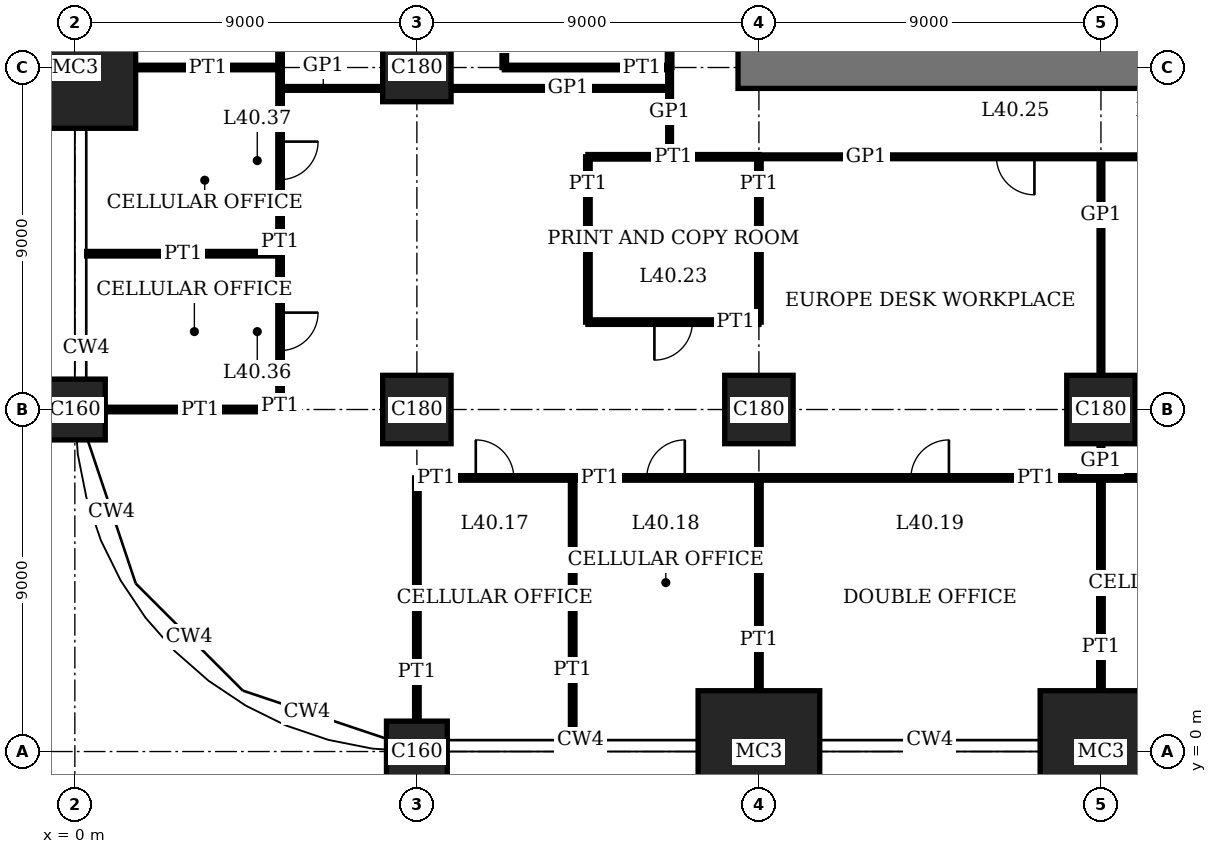
"""IFC4 building model, lengths in metres.
Left out: names, types, materials, properties, quantities, classifications, styles, units other than length and angle.
Written with IfcOpenShell. Run it as: python <this file> out.ifc"""

import sys

from ifc_helpers import new_model, si_unit, direction, frame, frame_2d, origin, origin_2d, place, context, subcontext, project, spatial, rectangle, extrude, element, fill, save


model = new_model("IFC4")
c1 = context("Model", 3, precision=1e-05, world=origin(), true_north=direction((0.0, 1.0)))
c2 = subcontext(c1, "Body", "Model", "MODEL_VIEW")
j1 = project(units=[si_unit("LENGTHUNIT", "METRE"), si_unit("PLANEANGLEUNIT", "RADIAN")], contexts=[c1])
p1 = place(None, origin())
s1 = spatial("IfcSite", under=j1, at=p1, CompositionType="ELEMENT")
p2 = place(p1, origin())
s2 = spatial("IfcBuilding", under=s1, at=p2, CompositionType="ELEMENT")
p3 = place(p2, frame((0.0, 0.0, 166.2)))
s3 = spatial("IfcBuildingStorey", under=s2, at=p3, CompositionType="ELEMENT", Elevation=166.2)
p4 = place(p3, frame((0.0, 9.0, 0.0), z_axis=(0.0, 0.0, 1.0), x_axis=(1.0, 0.0, 0.0)))
e1 = element("IfcColumn", 1, at=p4, inside=s3, PredefinedType="COLUMN", context=c2, shape_type="SweptSolid", body=[
    extrude(rectangle(XDim=1.6, YDim=1.6, at=origin_2d()), origin(), (0.0, 0.0, 1.0), 4.0),
])
p5 = place(p3, frame((0.0, 18.0, 0.0), z_axis=(0.0, 0.0, 1.0), x_axis=(1.0, 0.0, 0.0)))
e2 = element("IfcColumn", 2, at=p5, inside=s3, PredefinedType="COLUMN", context=c2, shape_type="SweptSolid", body=[
    extrude(rectangle(XDim=3.2, YDim=3.2, at=origin_2d()), origin(), (0.0, 0.0, 1.0), 4.0),
])
p6 = place(p3, frame((9.0, 0.0, 0.0), z_axis=(0.0, 0.0, 1.0), x_axis=(1.0, 0.0, 0.0)))
e3 = element("IfcColumn", 3, at=p6, inside=s3, PredefinedType="COLUMN", context=c2, shape_type="SweptSolid", body=[
    extrude(rectangle(XDim=1.6, YDim=1.6, at=origin_2d()), origin(), (0.0, 0.0, 1.0), 4.0),
])
for number, where, z_axis, x_axis in (
    (4, (9.0, 9.0, 0.0), (0.0, 0.0, 1.0), (1.0, 0.0, 0.0)),
    (5, (9.0, 18.0, 0.0), (0.0, 0.0, 1.0), (1.0, 0.0, 0.0)),
):
    element("IfcColumn", number, at=place(p3, frame(where, z_axis=z_axis, x_axis=x_axis)), inside=s3, PredefinedType="COLUMN", context=c2, shape_type="SweptSolid", body=[
        extrude(rectangle(XDim=1.8, YDim=1.8, at=origin_2d()), origin(), (0.0, 0.0, 1.0), 4.0),
    ])
p7 = place(p3, frame((18.0, 0.0, 0.0), z_axis=(0.0, 0.0, 1.0), x_axis=(1.0, 0.0, 0.0)))
e6 = element("IfcColumn", 6, at=p7, inside=s3, PredefinedType="COLUMN", context=c2, shape_type="SweptSolid", body=[
    extrude(rectangle(XDim=3.2, YDim=3.2, at=origin_2d()), origin(), (0.0, 0.0, 1.0), 4.0),
])
p8 = place(p3, frame((18.0, 9.0, 0.0), z_axis=(0.0, 0.0, 1.0), x_axis=(1.0, 0.0, 0.0)))
e7 = element("IfcColumn", 7, at=p8, inside=s3, PredefinedType="COLUMN", context=c2, shape_type="SweptSolid", body=[
    extrude(rectangle(XDim=1.8, YDim=1.8, at=origin_2d()), origin(), (0.0, 0.0, 1.0), 4.0),
])
p9 = place(p3, frame((27.0, 0.0, 0.0), z_axis=(0.0, 0.0, 1.0), x_axis=(1.0, 0.0, 0.0)))
e8 = element("IfcColumn", 8, at=p9, inside=s3, PredefinedType="COLUMN", context=c2, shape_type="SweptSolid", body=[
    extrude(rectangle(XDim=3.2, YDim=3.2, at=origin_2d()), origin(), (0.0, 0.0, 1.0), 4.0),
])
p10 = place(p3, frame((27.0, 9.0, 0.0), z_axis=(0.0, 0.0, 1.0), x_axis=(1.0, 0.0, 0.0)))
e9 = element("IfcColumn", 9, at=p10, inside=s3, PredefinedType="COLUMN", context=c2, shape_type="SweptSolid", body=[
    extrude(rectangle(XDim=1.8, YDim=1.8, at=origin_2d()), origin(), (0.0, 0.0, 1.0), 4.0),
])
p11 = place(p3, frame((17.45, 18.0, 0.0), z_axis=(0.0, 0.0, 1.0), x_axis=(1.0, 0.0, 0.0)))
e10 = element("IfcWall", 10, at=p11, inside=s3, PredefinedType="SHEAR", context=c2, shape_type="SweptSolid", body=[
    extrude(rectangle(XDim=28.1, YDim=1.1, at=frame_2d((14.05, 0.0))), origin(), (0.0, 0.0, 1.0), 4.0),
])
p12 = place(p11, frame((11.55, 0.0, 0.0)))
e11 = element("IfcOpeningElement", 11, at=p12, cuts=e10, PredefinedType="OPENING", context=c2, shape_type="SweptSolid", body=[
    extrude(rectangle(XDim=1.0, YDim=2.4, at=frame_2d((0.5, 1.2))), frame((0.0, 0.56, 0.0), z_axis=(0.0, -1.0, 0.0), x_axis=(1.0, 0.0, 0.0)), (0.0, 0.0, 1.0), 1.12),
])
p13 = place(p11, frame((16.55, 0.0, 0.0)))
e12 = element("IfcOpeningElement", 12, at=p13, cuts=e10, PredefinedType="OPENING", context=c2, shape_type="SweptSolid", body=[
    extrude(rectangle(XDim=1.0, YDim=2.4, at=frame_2d((0.5, 1.2))), frame((0.0, 0.56, 0.0), z_axis=(0.0, -1.0, 0.0), x_axis=(1.0, 0.0, 0.0)), (0.0, 0.0, 1.0), 1.12),
])
p14 = place(p11, frame((20.0, 0.0, 0.0)))
e13 = element("IfcOpeningElement", 13, at=p14, cuts=e10, PredefinedType="OPENING", context=c2, shape_type="SweptSolid", body=[
    extrude(rectangle(XDim=1.1, YDim=2.4, at=frame_2d((0.55, 1.2))), frame((0.0, 0.56, 0.0), z_axis=(0.0, -1.0, 0.0), x_axis=(1.0, 0.0, 0.0)), (0.0, 0.0, 1.0), 1.12),
])
p15 = place(p11, frame((24.05, 0.0, 0.0)))
e14 = element("IfcOpeningElement", 14, at=p15, cuts=e10, PredefinedType="OPENING", context=c2, shape_type="SweptSolid", body=[
    extrude(rectangle(XDim=1.0, YDim=2.4, at=frame_2d((0.5, 1.2))), frame((0.0, 0.56, 0.0), z_axis=(0.0, -1.0, 0.0), x_axis=(1.0, 0.0, 0.0)), (0.0, 0.0, 1.0), 1.12),
])
p16 = place(p3, frame((9.0, 7.2, 0.0), z_axis=(0.0, 0.0, 1.0), x_axis=(1.0, 0.0, 0.0)))
e15 = element("IfcWall", 15, at=p16, inside=s3, PredefinedType="PARTITIONING", context=c2, shape_type="SweptSolid", body=[
    extrude(rectangle(XDim=4.1, YDim=0.12, at=frame_2d((2.05, 0.0))), origin(), (0.0, 0.0, 1.0), 3.75),
])
p17 = place(p16, frame((1.55, 0.0, 0.0)))
e16 = element("IfcOpeningElement", 16, at=p17, cuts=e15, PredefinedType="OPENING", context=c2, shape_type="SweptSolid", body=[
    extrude(rectangle(XDim=1.0, YDim=2.4, at=frame_2d((0.5, 1.2))), frame((0.0, 0.07, 0.0), z_axis=(0.0, -1.0, 0.0), x_axis=(1.0, 0.0, 0.0)), (0.0, 0.0, 1.0), 0.14),
])
p18 = place(p3, frame((13.1, 7.2, 0.0), z_axis=(0.0, 0.0, 1.0), x_axis=(1.0, 0.0, 0.0)))
e17 = element("IfcWall", 17, at=p18, inside=s3, PredefinedType="PARTITIONING", context=c2, shape_type="SweptSolid", body=[
    extrude(rectangle(XDim=4.9, YDim=0.12, at=frame_2d((2.45, 0.0))), origin(), (0.0, 0.0, 1.0), 3.75),
])
p19 = place(p18, frame((1.95, 0.0, 0.0)))
e18 = element("IfcOpeningElement", 18, at=p19, cuts=e17, PredefinedType="OPENING", context=c2, shape_type="SweptSolid", body=[
    extrude(rectangle(XDim=1.0, YDim=2.4, at=frame_2d((0.5, 1.2))), frame((0.0, 0.07, 0.0), z_axis=(0.0, -1.0, 0.0), x_axis=(1.0, 0.0, 0.0)), (0.0, 0.0, 1.0), 0.14),
])
p20 = place(p3, frame((18.0, 7.2, 0.0), z_axis=(0.0, 0.0, 1.0), x_axis=(1.0, 0.0, 0.0)))
e19 = element("IfcWall", 19, at=p20, inside=s3, PredefinedType="PARTITIONING", context=c2, shape_type="SweptSolid", body=[
    extrude(rectangle(XDim=9.0, YDim=0.12, at=frame_2d((4.5, 0.0))), origin(), (0.0, 0.0, 1.0), 3.75),
])
p21 = place(p20, frame((4.0, 0.0, 0.0)))
e20 = element("IfcOpeningElement", 20, at=p21, cuts=e19, PredefinedType="OPENING", context=c2, shape_type="SweptSolid", body=[
    extrude(rectangle(XDim=1.0, YDim=2.4, at=frame_2d((0.5, 1.2))), frame((0.0, 0.07, 0.0), z_axis=(0.0, -1.0, 0.0), x_axis=(1.0, 0.0, 0.0)), (0.0, 0.0, 1.0), 0.14),
])
p22 = place(p3, frame((27.0, 7.2, 0.0), z_axis=(0.0, 0.0, 1.0), x_axis=(1.0, 0.0, 0.0)))
e21 = element("IfcWall", 21, at=p22, inside=s3, PredefinedType="PARTITIONING", context=c2, shape_type="SweptSolid", body=[
    extrude(rectangle(XDim=4.5, YDim=0.12, at=frame_2d((2.25, 0.0))), origin(), (0.0, 0.0, 1.0), 3.75),
])
p23 = place(p22, frame((1.75, 0.0, 0.0)))
e22 = element("IfcOpeningElement", 22, at=p23, cuts=e21, PredefinedType="OPENING", context=c2, shape_type="SweptSolid", body=[
    extrude(rectangle(XDim=1.0, YDim=2.4, at=frame_2d((0.5, 1.2))), frame((0.0, 0.07, 0.0), z_axis=(0.0, -1.0, 0.0), x_axis=(1.0, 0.0, 0.0)), (0.0, 0.0, 1.0), 0.14),
])
p24 = place(p3, frame((0.8, 9.0, 0.0), z_axis=(0.0, 0.0, 1.0), x_axis=(1.0, 0.0, 0.0)))
e23 = element("IfcWall", 23, at=p24, inside=s3, PredefinedType="PARTITIONING", context=c2, shape_type="SweptSolid", body=[
    extrude(rectangle(XDim=4.6, YDim=0.12, at=frame_2d((2.3, 0.0))), origin(), (0.0, 0.0, 1.0), 3.05),
])
p25 = place(p3, frame((13.5, 11.3, 0.0), z_axis=(0.0, 0.0, 1.0), x_axis=(1.0, 0.0, 0.0)))
e24 = element("IfcWall", 24, at=p25, inside=s3, PredefinedType="PARTITIONING", context=c2, shape_type="SweptSolid", body=[
    extrude(rectangle(XDim=4.5, YDim=0.12, at=frame_2d((2.25, 0.0))), origin(), (0.0, 0.0, 1.0), 3.75),
])
p26 = place(p25, frame((1.75, 0.0, 0.0)))
e25 = element("IfcOpeningElement", 25, at=p26, cuts=e24, PredefinedType="OPENING", context=c2, shape_type="SweptSolid", body=[
    extrude(rectangle(XDim=1.0, YDim=2.4, at=frame_2d((0.5, 1.2))), frame((0.0, 0.07, 0.0), z_axis=(0.0, -1.0, 0.0), x_axis=(1.0, 0.0, 0.0)), (0.0, 0.0, 1.0), 0.14),
])
p27 = place(p3, frame((0.31, 13.1, 0.0), z_axis=(0.0, 0.0, 1.0), x_axis=(1.0, 0.0, 0.0)))
e26 = element("IfcWall", 26, at=p27, inside=s3, PredefinedType="PARTITIONING", context=c2, shape_type="SweptSolid", body=[
    extrude(rectangle(XDim=5.09, YDim=0.12, at=frame_2d((2.545, 0.0))), origin(), (0.0, 0.0, 1.0), 3.75),
])
p28 = place(p3, frame((13.5, 15.65, 0.0), z_axis=(0.0, 0.0, 1.0), x_axis=(1.0, 0.0, 0.0)))
e27 = element("IfcWall", 27, at=p28, inside=s3, PredefinedType="PARTITIONING", context=c2, shape_type="SweptSolid", body=[
    extrude(rectangle(XDim=4.5, YDim=0.12, at=frame_2d((2.25, 0.0))), origin(), (0.0, 0.0, 1.0), 3.75),
])
p29 = place(p3, frame((18.0, 15.65, 0.0), z_axis=(0.0, 0.0, 1.0), x_axis=(1.0, 0.0, 0.0)))
e28 = element("IfcWall", 28, at=p29, inside=s3, PredefinedType="PARTITIONING", context=c2, shape_type="SweptSolid", body=[
    extrude(rectangle(XDim=13.5, YDim=0.1, at=frame_2d((6.75, 0.0))), origin(), (0.0, 0.0, 1.0), 3.75),
])
p30 = place(p29, frame((6.25, 0.0, 0.0)))
e29 = element("IfcOpeningElement", 29, at=p30, cuts=e28, PredefinedType="OPENING", context=c2, shape_type="SweptSolid", body=[
    extrude(rectangle(XDim=1.0, YDim=2.4, at=frame_2d((0.5, 1.2))), frame((0.0, 0.06, 0.0), z_axis=(0.0, -1.0, 0.0), x_axis=(1.0, 0.0, 0.0)), (0.0, 0.0, 1.0), 0.12),
])
p31 = place(p29, frame((10.3, 0.0, 0.0)))
e30 = element("IfcOpeningElement", 30, at=p31, cuts=e28, PredefinedType="OPENING", context=c2, shape_type="SweptSolid", body=[
    extrude(rectangle(XDim=1.0, YDim=2.4, at=frame_2d((0.5, 1.2))), frame((0.0, 0.06, 0.0), z_axis=(0.0, -1.0, 0.0), x_axis=(1.0, 0.0, 0.0)), (0.0, 0.0, 1.0), 0.12),
])
p32 = place(p3, frame((5.39, 17.45, 0.0), z_axis=(0.0, 0.0, 1.0), x_axis=(1.0, 0.0, 0.0)))
e31 = element("IfcWall", 31, at=p32, inside=s3, PredefinedType="PARTITIONING", context=c2, shape_type="SweptSolid", body=[
    extrude(rectangle(XDim=2.71, YDim=0.1, at=frame_2d((1.355, 0.0))), origin(), (0.0, 0.0, 1.0), 3.05),
])
p33 = place(p3, frame((9.9, 17.45, 0.0), z_axis=(0.0, 0.0, 1.0), x_axis=(1.0, 0.0, 0.0)))
e32 = element("IfcWall", 32, at=p33, inside=s3, PredefinedType="PARTITIONING", context=c2, shape_type="SweptSolid", body=[
    extrude(rectangle(XDim=5.75, YDim=0.1, at=frame_2d((2.875, 0.0))), origin(), (0.0, 0.0, 1.0), 3.05),
])
p34 = place(p3, frame((1.6, 18.0, 0.0), z_axis=(0.0, 0.0, 1.0), x_axis=(1.0, 0.0, 0.0)))
e33 = element("IfcWall", 33, at=p34, inside=s3, PredefinedType="PARTITIONING", context=c2, shape_type="SweptSolid", body=[
    extrude(rectangle(XDim=3.8, YDim=0.12, at=frame_2d((1.9, 0.0))), origin(), (0.0, 0.0, 1.0), 3.05),
])
p35 = place(p3, frame((11.3, 18.0, 0.0), z_axis=(0.0, 0.0, 1.0), x_axis=(1.0, 0.0, 0.0)))
e34 = element("IfcWall", 34, at=p35, inside=s3, PredefinedType="PARTITIONING", context=c2, shape_type="SweptSolid", body=[
    extrude(rectangle(XDim=4.35, YDim=0.12, at=frame_2d((2.175, 0.0))), origin(), (0.0, 0.0, 1.0), 3.05),
])
p36 = place(p3, frame((5.4, 9.0, 0.0), z_axis=(0.0, 0.0, 1.0), x_axis=(0.0, 1.0, 0.0)))
e35 = element("IfcWall", 35, at=p36, inside=s3, PredefinedType="PARTITIONING", context=c2, shape_type="SweptSolid", body=[
    extrude(rectangle(XDim=4.1, YDim=0.12, at=frame_2d((2.05, 0.0))), origin(), (0.0, 0.0, 1.0), 3.75),
])
p37 = place(p36, frame((1.55, 0.0, 0.0)))
e36 = element("IfcOpeningElement", 36, at=p37, cuts=e35, PredefinedType="OPENING", context=c2, shape_type="SweptSolid", body=[
    extrude(rectangle(XDim=1.0, YDim=2.4, at=frame_2d((0.5, 1.2))), frame((0.0, 0.07, 0.0), z_axis=(0.0, -1.0, 0.0), x_axis=(1.0, 0.0, 0.0)), (0.0, 0.0, 1.0), 0.14),
])
p38 = place(p3, frame((5.4, 13.1, 0.0), z_axis=(0.0, 0.0, 1.0), x_axis=(0.0, 1.0, 0.0)))
e37 = element("IfcWall", 37, at=p38, inside=s3, PredefinedType="PARTITIONING", context=c2, shape_type="SweptSolid", body=[
    extrude(rectangle(XDim=4.9, YDim=0.12, at=frame_2d((2.45, 0.0))), origin(), (0.0, 0.0, 1.0), 3.75),
])
p39 = place(p38, frame((1.95, 0.0, 0.0)))
e38 = element("IfcOpeningElement", 38, at=p39, cuts=e37, PredefinedType="OPENING", context=c2, shape_type="SweptSolid", body=[
    extrude(rectangle(XDim=1.0, YDim=2.4, at=frame_2d((0.5, 1.2))), frame((0.0, 0.07, 0.0), z_axis=(0.0, -1.0, 0.0), x_axis=(1.0, 0.0, 0.0)), (0.0, 0.0, 1.0), 0.14),
])
p40 = place(p3, frame((5.4, 18.0, 0.0), z_axis=(0.0, 0.0, 1.0), x_axis=(0.0, 1.0, 0.0)))
e39 = element("IfcWall", 39, at=p40, inside=s3, PredefinedType="PARTITIONING", context=c2, shape_type="SweptSolid", body=[
    extrude(rectangle(XDim=4.5, YDim=0.12, at=frame_2d((2.25, 0.0))), origin(), (0.0, 0.0, 1.0), 3.75),
])
p41 = place(p40, frame((1.75, 0.0, 0.0)))
e40 = element("IfcOpeningElement", 40, at=p41, cuts=e39, PredefinedType="OPENING", context=c2, shape_type="SweptSolid", body=[
    extrude(rectangle(XDim=1.0, YDim=2.4, at=frame_2d((0.5, 1.2))), frame((0.0, 0.07, 0.0), z_axis=(0.0, -1.0, 0.0), x_axis=(1.0, 0.0, 0.0)), (0.0, 0.0, 1.0), 0.14),
])
p42 = place(p3, frame((9.0, 0.8, 0.0), z_axis=(0.0, 0.0, 1.0), x_axis=(0.0, 1.0, 0.0)))
e41 = element("IfcWall", 41, at=p42, inside=s3, PredefinedType="PARTITIONING", context=c2, shape_type="SweptSolid", body=[
    extrude(rectangle(XDim=6.4, YDim=0.12, at=frame_2d((3.2, 0.0))), origin(), (0.0, 0.0, 1.0), 3.05),
])
p43 = place(p3, frame((11.3, 18.0, 0.0), z_axis=(0.0, 0.0, 1.0), x_axis=(0.0, 1.0, 0.0)))
e42 = element("IfcWall", 42, at=p43, inside=s3, PredefinedType="PARTITIONING", context=c2, shape_type="SweptSolid", body=[
    extrude(rectangle(XDim=4.5, YDim=0.12, at=frame_2d((2.25, 0.0))), origin(), (0.0, 0.0, 1.0), 3.75),
])
p44 = place(p43, frame((1.75, 0.0, 0.0)))
e43 = element("IfcOpeningElement", 43, at=p44, cuts=e42, PredefinedType="OPENING", context=c2, shape_type="SweptSolid", body=[
    extrude(rectangle(XDim=1.0, YDim=2.4, at=frame_2d((0.5, 1.2))), frame((0.0, 0.07, 0.0), z_axis=(0.0, -1.0, 0.0), x_axis=(1.0, 0.0, 0.0)), (0.0, 0.0, 1.0), 0.14),
])
p45 = place(p3, frame((13.1, 0.31, 0.0), z_axis=(0.0, 0.0, 1.0), x_axis=(0.0, 1.0, 0.0)))
e44 = element("IfcWall", 44, at=p45, inside=s3, PredefinedType="PARTITIONING", context=c2, shape_type="SweptSolid", body=[
    extrude(rectangle(XDim=6.89, YDim=0.12, at=frame_2d((3.445, 0.0))), origin(), (0.0, 0.0, 1.0), 3.75),
])
p46 = place(p3, frame((13.5, 11.3, 0.0), z_axis=(0.0, 0.0, 1.0), x_axis=(0.0, 1.0, 0.0)))
e45 = element("IfcWall", 45, at=p46, inside=s3, PredefinedType="PARTITIONING", context=c2, shape_type="SweptSolid", body=[
    extrude(rectangle(XDim=4.35, YDim=0.12, at=frame_2d((2.175, 0.0))), origin(), (0.0, 0.0, 1.0), 3.75),
])
p47 = place(p3, frame((15.65, 18.0, 0.0), z_axis=(0.0, 0.0, 1.0), x_axis=(0.0, 1.0, 0.0)))
e46 = element("IfcWall", 46, at=p47, inside=s3, PredefinedType="PARTITIONING", context=c2, shape_type="SweptSolid", body=[
    extrude(rectangle(XDim=4.5, YDim=0.12, at=frame_2d((2.25, 0.0))), origin(), (0.0, 0.0, 1.0), 3.75),
])
p48 = place(p3, frame((15.65, 15.65, 0.0), z_axis=(0.0, 0.0, 1.0), x_axis=(0.0, 1.0, 0.0)))
e47 = element("IfcWall", 47, at=p48, inside=s3, PredefinedType="PARTITIONING", context=c2, shape_type="SweptSolid", body=[
    extrude(rectangle(XDim=2.35, YDim=0.1, at=frame_2d((1.175, 0.0))), origin(), (0.0, 0.0, 1.0), 3.75),
])
p49 = place(p3, frame((18.0, 1.6, 0.0), z_axis=(0.0, 0.0, 1.0), x_axis=(0.0, 1.0, 0.0)))
e48 = element("IfcWall", 48, at=p49, inside=s3, PredefinedType="PARTITIONING", context=c2, shape_type="SweptSolid", body=[
    extrude(rectangle(XDim=5.6, YDim=0.12, at=frame_2d((2.8, 0.0))), origin(), (0.0, 0.0, 1.0), 3.05),
])
p50 = place(p3, frame((18.0, 11.3, 0.0), z_axis=(0.0, 0.0, 1.0), x_axis=(0.0, 1.0, 0.0)))
e49 = element("IfcWall", 49, at=p50, inside=s3, PredefinedType="PARTITIONING", context=c2, shape_type="SweptSolid", body=[
    extrude(rectangle(XDim=4.35, YDim=0.12, at=frame_2d((2.175, 0.0))), origin(), (0.0, 0.0, 1.0), 3.05),
])
p51 = place(p3, frame((27.0, 1.6, 0.0), z_axis=(0.0, 0.0, 1.0), x_axis=(0.0, 1.0, 0.0)))
e50 = element("IfcWall", 50, at=p51, inside=s3, PredefinedType="PARTITIONING", context=c2, shape_type="SweptSolid", body=[
    extrude(rectangle(XDim=5.6, YDim=0.12, at=frame_2d((2.8, 0.0))), origin(), (0.0, 0.0, 1.0), 3.05),
])
p52 = place(p3, frame((27.0, 7.2, 0.0), z_axis=(0.0, 0.0, 1.0), x_axis=(0.0, 1.0, 0.0)))
e51 = element("IfcWall", 51, at=p52, inside=s3, PredefinedType="PARTITIONING", context=c2, shape_type="SweptSolid", body=[
    extrude(rectangle(XDim=0.9, YDim=0.1, at=frame_2d((0.45, 0.0))), origin(), (0.0, 0.0, 1.0), 3.05),
])
p53 = place(p3, frame((27.0, 9.9, 0.0), z_axis=(0.0, 0.0, 1.0), x_axis=(0.0, 1.0, 0.0)))
e52 = element("IfcWall", 52, at=p53, inside=s3, PredefinedType="PARTITIONING", context=c2, shape_type="SweptSolid", body=[
    extrude(rectangle(XDim=5.75, YDim=0.1, at=frame_2d((2.875, 0.0))), origin(), (0.0, 0.0, 1.0), 3.05),
])
p54 = place(p17, origin())
e53 = element("IfcDoor", 53, at=p54, inside=s3, OperationType="SINGLE_SWING_RIGHT", PredefinedType="DOOR", context=c2, shape_type="SweptSolid", body=[
    extrude(rectangle(XDim=1.0, YDim=2.4, at=frame_2d((0.5, 1.2))), frame((0.0, 0.025, 0.0), z_axis=(0.0, -1.0, 0.0), x_axis=(1.0, 0.0, 0.0)), (0.0, 0.0, 1.0), 0.05),
])
fill(e16, e53)
p55 = place(p19, origin())
e54 = element("IfcDoor", 54, at=p55, inside=s3, OperationType="SINGLE_SWING_LEFT", PredefinedType="DOOR", context=c2, shape_type="SweptSolid", body=[
    extrude(rectangle(XDim=1.0, YDim=2.4, at=frame_2d((0.5, 1.2))), frame((0.0, 0.025, 0.0), z_axis=(0.0, -1.0, 0.0), x_axis=(1.0, 0.0, 0.0)), (0.0, 0.0, 1.0), 0.05),
])
fill(e18, e54)
p56 = place(p21, origin())
e55 = element("IfcDoor", 55, at=p56, inside=s3, OperationType="SINGLE_SWING_LEFT", PredefinedType="DOOR", context=c2, shape_type="SweptSolid", body=[
    extrude(rectangle(XDim=1.0, YDim=2.4, at=frame_2d((0.5, 1.2))), frame((0.0, 0.025, 0.0), z_axis=(0.0, -1.0, 0.0), x_axis=(1.0, 0.0, 0.0)), (0.0, 0.0, 1.0), 0.05),
])
fill(e20, e55)
p57 = place(p26, origin())
e56 = element("IfcDoor", 56, at=p57, inside=s3, OperationType="SINGLE_SWING_LEFT", PredefinedType="DOOR", context=c2, shape_type="SweptSolid", body=[
    extrude(rectangle(XDim=1.0, YDim=2.4, at=frame_2d((0.5, 1.2))), frame((0.0, 0.025, 0.0), z_axis=(0.0, -1.0, 0.0), x_axis=(1.0, 0.0, 0.0)), (0.0, 0.0, 1.0), 0.05),
])
fill(e25, e56)
p58 = place(p30, origin())
e57 = element("IfcDoor", 57, at=p58, inside=s3, OperationType="SINGLE_SWING_RIGHT", PredefinedType="DOOR", context=c2, shape_type="SweptSolid", body=[
    extrude(rectangle(XDim=1.0, YDim=2.4, at=frame_2d((0.5, 1.2))), frame((0.0, 0.02, 0.0), z_axis=(0.0, -1.0, 0.0), x_axis=(1.0, 0.0, 0.0)), (0.0, 0.0, 1.0), 0.04),
])
fill(e29, e57)
p59 = place(p37, origin())
e58 = element("IfcDoor", 58, at=p59, inside=s3, OperationType="SINGLE_SWING_RIGHT", PredefinedType="DOOR", context=c2, shape_type="SweptSolid", body=[
    extrude(rectangle(XDim=1.0, YDim=2.4, at=frame_2d((0.5, 1.2))), frame((0.0, 0.025, 0.0), z_axis=(0.0, -1.0, 0.0), x_axis=(1.0, 0.0, 0.0)), (0.0, 0.0, 1.0), 0.05),
])
fill(e36, e58)
p60 = place(p39, origin())
e59 = element("IfcDoor", 59, at=p60, inside=s3, OperationType="SINGLE_SWING_RIGHT", PredefinedType="DOOR", context=c2, shape_type="SweptSolid", body=[
    extrude(rectangle(XDim=1.0, YDim=2.4, at=frame_2d((0.5, 1.2))), frame((0.0, 0.025, 0.0), z_axis=(0.0, -1.0, 0.0), x_axis=(1.0, 0.0, 0.0)), (0.0, 0.0, 1.0), 0.05),
])
fill(e38, e59)
save(model, sys.argv[1])
